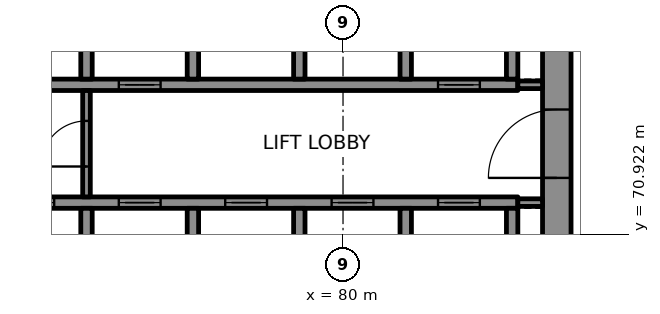
"""IFC4 building model, lengths in metres.
Left out: names, types, materials, properties, quantities, classifications, styles, units other than length and angle.
Written with IfcOpenShell. Run it as: python <this file> out.ifc"""

import sys

from ifc_helpers import new_model, si_unit, direction, frame, frame_2d, origin, place, context, subcontext, project, spatial, rectangle, extrude, element, fill, save


model = new_model("IFC4")
c1 = context("Model", 3, precision=1e-05, world=origin(), true_north=direction((0.0, 1.0)))
c2 = subcontext(c1, "Body", "Model", "MODEL_VIEW")
j1 = project(units=[si_unit("LENGTHUNIT", "METRE"), si_unit("PLANEANGLEUNIT", "RADIAN")], contexts=[c1])
p1 = place(None, origin())
s1 = spatial("IfcSite", under=j1, at=p1, CompositionType="ELEMENT")
p2 = place(p1, origin())
s2 = spatial("IfcBuilding", under=s1, at=p2, CompositionType="ELEMENT")
p3 = place(p2, frame((0.0, 0.0, 233.8)))
s3 = spatial("IfcBuildingStorey", under=s2, at=p3, CompositionType="ELEMENT", Elevation=233.8)
p4 = place(p3, frame((85.625, 67.75, 0.0), z_axis=(0.0, 0.0, 1.0), x_axis=(0.0, 1.0, 0.0)))
e1 = element("IfcWall", 1, at=p4, inside=s3, PredefinedType="SHEAR", context=c2, shape_type="SweptSolid", body=[
    extrude(rectangle(XDim=14.5, YDim=0.75, at=frame_2d((7.25, 0.0))), origin(), (0.0, 0.0, 1.0), 3.7),
])
p5 = place(p4, frame((4.65, 0.0, 0.0)))
e2 = element("IfcOpeningElement", 2, at=p5, cuts=e1, PredefinedType="OPENING", context=c2, shape_type="SweptSolid", body=[
    extrude(rectangle(XDim=1.8, YDim=2.1, at=frame_2d((0.9, 1.05))), frame((0.0, 0.385, 0.0), z_axis=(0.0, -1.0, 0.0), x_axis=(1.0, 0.0, 0.0)), (0.0, 0.0, 1.0), 0.77),
])
p6 = place(p4, frame((11.8, 0.0, 0.0)))
e3 = element("IfcOpeningElement", 3, at=p6, cuts=e1, PredefinedType="OPENING", context=c2, shape_type="SweptSolid", body=[
    extrude(rectangle(XDim=0.9, YDim=2.1, at=frame_2d((0.45, 1.05))), frame((0.0, 0.385, 0.0), z_axis=(0.0, -1.0, 0.0), x_axis=(1.0, 0.0, 0.0)), (0.0, 0.0, 1.0), 0.77),
])
p7 = place(p3, frame((70.3, 71.75, 0.0), z_axis=(0.0, 0.0, 1.0), x_axis=(1.0, 0.0, 0.0)))
e4 = element("IfcWall", 4, at=p7, inside=s3, PredefinedType="SHEAR", context=c2, shape_type="SweptSolid", body=[
    extrude(rectangle(XDim=14.3, YDim=0.3, at=frame_2d((7.15, 0.0))), origin(), (0.0, 0.0, 1.0), 3.7),
])
p8 = place(p7, frame((1.0, 0.0, 0.0)))
e5 = element("IfcOpeningElement", 5, at=p8, cuts=e4, PredefinedType="OPENING", context=c2, shape_type="SweptSolid", body=[
    extrude(rectangle(XDim=1.1, YDim=2.1, at=frame_2d((0.55, 1.05))), frame((0.0, 0.16, 0.0), z_axis=(0.0, -1.0, 0.0), x_axis=(1.0, 0.0, 0.0)), (0.0, 0.0, 1.0), 0.32),
])
p9 = place(p7, frame((3.8, 0.0, 0.0)))
e6 = element("IfcOpeningElement", 6, at=p9, cuts=e4, PredefinedType="OPENING", context=c2, shape_type="SweptSolid", body=[
    extrude(rectangle(XDim=1.1, YDim=2.1, at=frame_2d((0.55, 1.05))), frame((0.0, 0.16, 0.0), z_axis=(0.0, -1.0, 0.0), x_axis=(1.0, 0.0, 0.0)), (0.0, 0.0, 1.0), 0.32),
])
p10 = place(p7, frame((6.6, 0.0, 0.0)))
e7 = element("IfcOpeningElement", 7, at=p10, cuts=e4, PredefinedType="OPENING", context=c2, shape_type="SweptSolid", body=[
    extrude(rectangle(XDim=1.1, YDim=2.1, at=frame_2d((0.55, 1.05))), frame((0.0, 0.16, 0.0), z_axis=(0.0, -1.0, 0.0), x_axis=(1.0, 0.0, 0.0)), (0.0, 0.0, 1.0), 0.32),
])
p11 = place(p7, frame((9.4, 0.0, 0.0)))
e8 = element("IfcOpeningElement", 8, at=p11, cuts=e4, PredefinedType="OPENING", context=c2, shape_type="SweptSolid", body=[
    extrude(rectangle(XDim=1.1, YDim=2.1, at=frame_2d((0.55, 1.05))), frame((0.0, 0.16, 0.0), z_axis=(0.0, -1.0, 0.0), x_axis=(1.0, 0.0, 0.0)), (0.0, 0.0, 1.0), 0.32),
])
p12 = place(p7, frame((12.2, 0.0, 0.0)))
e9 = element("IfcOpeningElement", 9, at=p12, cuts=e4, PredefinedType="OPENING", context=c2, shape_type="SweptSolid", body=[
    extrude(rectangle(XDim=1.1, YDim=2.1, at=frame_2d((0.55, 1.05))), frame((0.0, 0.16, 0.0), z_axis=(0.0, -1.0, 0.0), x_axis=(1.0, 0.0, 0.0)), (0.0, 0.0, 1.0), 0.32),
])
p13 = place(p3, frame((70.3, 74.85, 0.0), z_axis=(0.0, 0.0, 1.0), x_axis=(1.0, 0.0, 0.0)))
e10 = element("IfcWall", 10, at=p13, inside=s3, PredefinedType="SHEAR", context=c2, shape_type="SweptSolid", body=[
    extrude(rectangle(XDim=14.3, YDim=0.3, at=frame_2d((7.15, 0.0))), origin(), (0.0, 0.0, 1.0), 3.7),
])
p14 = place(p13, frame((3.8, 0.0, 0.0)))
e11 = element("IfcOpeningElement", 11, at=p14, cuts=e10, PredefinedType="OPENING", context=c2, shape_type="SweptSolid", body=[
    extrude(rectangle(XDim=1.1, YDim=2.1, at=frame_2d((0.55, 1.05))), frame((0.0, 0.16, 0.0), z_axis=(0.0, -1.0, 0.0), x_axis=(1.0, 0.0, 0.0)), (0.0, 0.0, 1.0), 0.32),
])
p15 = place(p13, frame((12.2, 0.0, 0.0)))
e12 = element("IfcOpeningElement", 12, at=p15, cuts=e10, PredefinedType="OPENING", context=c2, shape_type="SweptSolid", body=[
    extrude(rectangle(XDim=1.1, YDim=2.1, at=frame_2d((0.55, 1.05))), frame((0.0, 0.16, 0.0), z_axis=(0.0, -1.0, 0.0), x_axis=(1.0, 0.0, 0.0)), (0.0, 0.0, 1.0), 0.32),
])
for number, where, z_axis, x_axis in (
    (13, (73.25, 69.0, 0.0), (0.0, 0.0, 1.0), (0.0, 1.0, 0.0)),
    (14, (73.25, 75.0, 0.0), (0.0, 0.0, 1.0), (0.0, 1.0, 0.0)),
    (15, (76.05, 69.0, 0.0), (0.0, 0.0, 1.0), (0.0, 1.0, 0.0)),
    (16, (76.05, 75.0, 0.0), (0.0, 0.0, 1.0), (0.0, 1.0, 0.0)),
    (17, (78.85, 69.0, 0.0), (0.0, 0.0, 1.0), (0.0, 1.0, 0.0)),
    (18, (78.85, 75.0, 0.0), (0.0, 0.0, 1.0), (0.0, 1.0, 0.0)),
    (19, (81.65, 69.0, 0.0), (0.0, 0.0, 1.0), (0.0, 1.0, 0.0)),
    (20, (81.65, 75.0, 0.0), (0.0, 0.0, 1.0), (0.0, 1.0, 0.0)),
    (21, (84.45, 69.0, 0.0), (0.0, 0.0, 1.0), (0.0, 1.0, 0.0)),
    (22, (84.45, 75.0, 0.0), (0.0, 0.0, 1.0), (0.0, 1.0, 0.0)),
):
    element("IfcWall", number, at=place(p3, frame(where, z_axis=z_axis, x_axis=x_axis)), inside=s3, PredefinedType="SHEAR", context=c2, shape_type="SweptSolid", body=[
        extrude(rectangle(XDim=2.6, YDim=0.3, at=frame_2d((1.3, 0.0))), origin(), (0.0, 0.0, 1.0), 3.7),
    ])
for number, where, z_axis, x_axis in (
    (23, (84.6, 71.75, 0.0), (0.0, 0.0, 1.0), (1.0, 0.0, 0.0)),
    (24, (84.6, 74.85, 0.0), (0.0, 0.0, 1.0), (1.0, 0.0, 0.0)),
):
    element("IfcWall", number, at=place(p3, frame(where, z_axis=z_axis, x_axis=x_axis)), inside=s3, PredefinedType="PARTITIONING", context=c2, shape_type="SweptSolid", body=[
        extrude(rectangle(XDim=0.65, YDim=0.2, at=frame_2d((0.325, 0.0))), origin(), (0.0, 0.0, 1.0), 3.7),
    ])
p16 = place(p3, frame((73.25, 71.9, 0.0), z_axis=(0.0, 0.0, 1.0), x_axis=(0.0, 1.0, 0.0)))
e25 = element("IfcWall", 25, at=p16, inside=s3, PredefinedType="PARTITIONING", context=c2, shape_type="SweptSolid", body=[
    extrude(rectangle(XDim=2.8, YDim=0.2, at=frame_2d((1.4, 0.0))), origin(), (0.0, 0.0, 1.0), 3.7),
])
p17 = place(p16, frame((0.8, 0.0, 0.0)))
e26 = element("IfcOpeningElement", 26, at=p17, cuts=e25, PredefinedType="OPENING", context=c2, shape_type="SweptSolid", body=[
    extrude(rectangle(XDim=1.2, YDim=2.1, at=frame_2d((0.6, 1.05))), frame((0.0, 0.11, 0.0), z_axis=(0.0, -1.0, 0.0), x_axis=(1.0, 0.0, 0.0)), (0.0, 0.0, 1.0), 0.22),
])
p18 = place(p8, origin())
e27 = element("IfcDoor", 27, at=p18, inside=s3, OperationType="DOUBLE_DOOR_SLIDING", PredefinedType="DOOR", context=c2, shape_type="SweptSolid", body=[
    extrude(rectangle(XDim=1.1, YDim=2.1, at=frame_2d((0.55, 1.05))), frame((0.0, 0.025, 0.0), z_axis=(0.0, -1.0, 0.0), x_axis=(1.0, 0.0, 0.0)), (0.0, 0.0, 1.0), 0.05),
])
fill(e5, e27)
p19 = place(p9, origin())
e28 = element("IfcDoor", 28, at=p19, inside=s3, OperationType="DOUBLE_DOOR_SLIDING", PredefinedType="DOOR", context=c2, shape_type="SweptSolid", body=[
    extrude(rectangle(XDim=1.1, YDim=2.1, at=frame_2d((0.55, 1.05))), frame((0.0, 0.025, 0.0), z_axis=(0.0, -1.0, 0.0), x_axis=(1.0, 0.0, 0.0)), (0.0, 0.0, 1.0), 0.05),
])
fill(e6, e28)
p20 = place(p10, origin())
e29 = element("IfcDoor", 29, at=p20, inside=s3, OperationType="DOUBLE_DOOR_SLIDING", PredefinedType="DOOR", context=c2, shape_type="SweptSolid", body=[
    extrude(rectangle(XDim=1.1, YDim=2.1, at=frame_2d((0.55, 1.05))), frame((0.0, 0.025, 0.0), z_axis=(0.0, -1.0, 0.0), x_axis=(1.0, 0.0, 0.0)), (0.0, 0.0, 1.0), 0.05),
])
fill(e7, e29)
p21 = place(p11, origin())
e30 = element("IfcDoor", 30, at=p21, inside=s3, OperationType="DOUBLE_DOOR_SLIDING", PredefinedType="DOOR", context=c2, shape_type="SweptSolid", body=[
    extrude(rectangle(XDim=1.1, YDim=2.1, at=frame_2d((0.55, 1.05))), frame((0.0, 0.025, 0.0), z_axis=(0.0, -1.0, 0.0), x_axis=(1.0, 0.0, 0.0)), (0.0, 0.0, 1.0), 0.05),
])
fill(e8, e30)
p22 = place(p12, origin())
e31 = element("IfcDoor", 31, at=p22, inside=s3, OperationType="DOUBLE_DOOR_SLIDING", PredefinedType="DOOR", context=c2, shape_type="SweptSolid", body=[
    extrude(rectangle(XDim=1.1, YDim=2.1, at=frame_2d((0.55, 1.05))), frame((0.0, 0.025, 0.0), z_axis=(0.0, -1.0, 0.0), x_axis=(1.0, 0.0, 0.0)), (0.0, 0.0, 1.0), 0.05),
])
fill(e9, e31)
p23 = place(p14, origin())
e32 = element("IfcDoor", 32, at=p23, inside=s3, OperationType="DOUBLE_DOOR_SLIDING", PredefinedType="DOOR", context=c2, shape_type="SweptSolid", body=[
    extrude(rectangle(XDim=1.1, YDim=2.1, at=frame_2d((0.55, 1.05))), frame((0.0, 0.025, 0.0), z_axis=(0.0, -1.0, 0.0), x_axis=(1.0, 0.0, 0.0)), (0.0, 0.0, 1.0), 0.05),
])
fill(e11, e32)
p24 = place(p15, origin())
e33 = element("IfcDoor", 33, at=p24, inside=s3, OperationType="DOUBLE_DOOR_SLIDING", PredefinedType="DOOR", context=c2, shape_type="SweptSolid", body=[
    extrude(rectangle(XDim=1.1, YDim=2.1, at=frame_2d((0.55, 1.05))), frame((0.0, 0.025, 0.0), z_axis=(0.0, -1.0, 0.0), x_axis=(1.0, 0.0, 0.0)), (0.0, 0.0, 1.0), 0.05),
])
fill(e12, e33)
p25 = place(p17, origin())
e34 = element("IfcDoor", 34, at=p25, inside=s3, OperationType="SINGLE_SWING_LEFT", PredefinedType="DOOR", context=c2, shape_type="SweptSolid", body=[
    extrude(rectangle(XDim=1.2, YDim=2.1, at=frame_2d((0.6, 1.05))), frame((0.0, 0.025, 0.0), z_axis=(0.0, -1.0, 0.0), x_axis=(1.0, 0.0, 0.0)), (0.0, 0.0, 1.0), 0.05),
])
fill(e26, e34)
p26 = place(p5, origin())
e35 = element("IfcDoor", 35, at=p26, inside=s3, OperationType="SINGLE_SWING_RIGHT", PredefinedType="DOOR", context=c2, shape_type="SweptSolid", body=[
    extrude(rectangle(XDim=1.8, YDim=2.1, at=frame_2d((0.9, 1.05))), frame((0.0, 0.095, 0.0), z_axis=(0.0, -1.0, 0.0), x_axis=(1.0, 0.0, 0.0)), (0.0, 0.0, 1.0), 0.19),
])
fill(e2, e35)
save(model, sys.argv[1])
